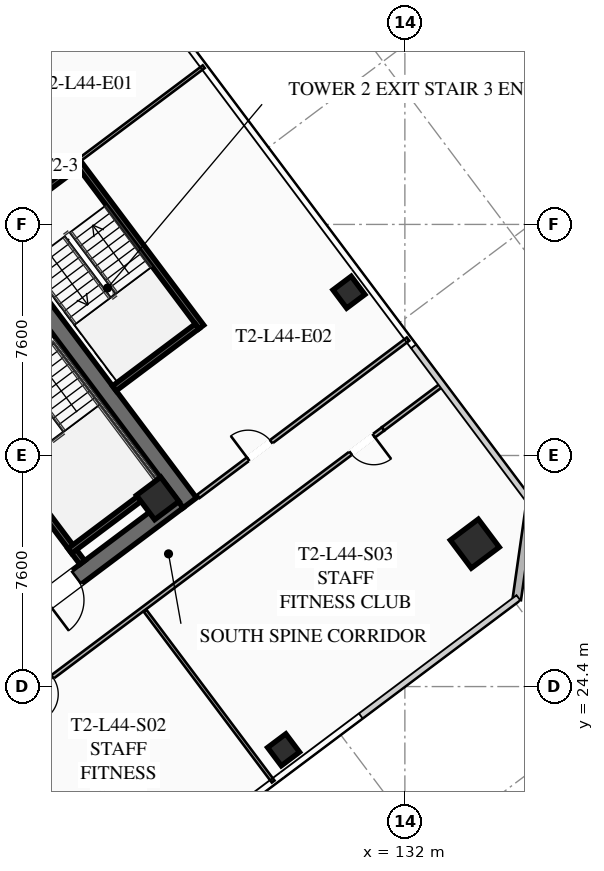
"""IFC4 building model, lengths in metres.
Left out: names, types, materials, properties, quantities, classifications, styles, units other than length and angle.
Written with IfcOpenShell. Run it as: python <this file> out.ifc"""

import sys

from ifc_helpers import new_model, si_unit, direction, frame, frame_2d, origin, origin_2d, place, context, subcontext, project, spatial, rectangle, hollow_rectangle, extrude, element, fill, save


model = new_model("IFC4")
c1 = context("Model", 3, precision=1e-05, world=origin(), true_north=direction((0.0, 1.0)))
c2 = subcontext(c1, "Body", "Model", "MODEL_VIEW")
j1 = project(units=[si_unit("LENGTHUNIT", "METRE"), si_unit("PLANEANGLEUNIT", "RADIAN")], contexts=[c1])
p1 = place(None, origin())
s1 = spatial("IfcSite", under=j1, at=p1, CompositionType="ELEMENT")
p2 = place(p1, origin())
s2 = spatial("IfcBuilding", under=s1, at=p2, CompositionType="ELEMENT")
p3 = place(p2, frame((0.0, 0.0, 164.1)))
s3 = spatial("IfcBuildingStorey", under=s2, at=p3, CompositionType="ELEMENT", Elevation=164.1)
p4 = place(p3, frame((115.564, 42.923, 0.0), z_axis=(0.0, 0.0, 1.0), x_axis=(0.600005007985, -0.799996243986, 0.0)))
e1 = element("IfcWall", 1, at=p4, inside=s3, PredefinedType="SHEAR", context=c2, shape_type="SweptSolid", body=[
    extrude(rectangle(XDim=15.6, YDim=0.55, at=frame_2d((7.8, 0.0))), origin(), (0.0, 0.0, 1.0), 3.55),
])
p5 = place(p3, frame((124.539, 30.498, 0.0), z_axis=(0.0, 0.0, 1.0), x_axis=(-0.799998054672, -0.600002593761, 0.0)))
e2 = element("IfcWall", 2, at=p5, inside=s3, PredefinedType="SHEAR", context=c2, shape_type="SweptSolid", body=[
    extrude(rectangle(XDim=15.06, YDim=0.55, at=frame_2d((7.53, 0.0))), origin(), (0.0, 0.0, 1.0), 3.55),
])
p6 = place(p5, frame((9.23, 0.0, 0.0)))
e3 = element("IfcOpeningElement", 3, at=p6, cuts=e2, PredefinedType="OPENING", context=c2, shape_type="SweptSolid", body=[
    extrude(rectangle(XDim=1.25, YDim=2.25, at=frame_2d((0.625, 1.125))), frame((0.0, 0.285, 0.0), z_axis=(0.0, -1.0, 0.0), x_axis=(1.0, 0.0, 0.0)), (0.0, 0.0, 1.0), 0.57),
])
p7 = place(p5, frame((4.18, 0.0, 0.0)))
e4 = element("IfcOpeningElement", 4, at=p7, cuts=e2, PredefinedType="OPENING", context=c2, shape_type="SweptSolid", body=[
    extrude(rectangle(XDim=1.25, YDim=2.25, at=frame_2d((0.625, 1.125))), frame((0.0, 0.285, 0.0), z_axis=(0.0, -1.0, 0.0), x_axis=(1.0, 0.0, 0.0)), (0.0, 0.0, 1.0), 0.57),
])
p8 = place(p3, frame((123.87, 30.59, 0.0), z_axis=(0.0, 0.0, 1.0), x_axis=(0.799999996291, 0.600000004945, 0.0)))
e5 = element("IfcColumn", 5, at=p8, inside=s3, PredefinedType="COLUMN", context=c2, shape_type="SweptSolid", body=[
    extrude(hollow_rectangle(XDim=1.0, YDim=1.0, WallThickness=0.04, at=origin_2d()), origin(), (0.0, 0.0, 1.0), 3.37),
])
p9 = place(p3, frame((134.3, 29.1, 0.0), z_axis=(0.0, 0.0, 1.0), x_axis=(0.799999996291, 0.600000004945, 0.0)))
e6 = element("IfcColumn", 6, at=p9, inside=s3, PredefinedType="COLUMN", context=c2, shape_type="SweptSolid", body=[
    extrude(hollow_rectangle(XDim=1.15, YDim=1.15, WallThickness=0.045, at=origin_2d()), origin(), (0.0, 0.0, 1.0), 3.37),
])
for number, where, z_axis, x_axis in (
    (7, (128.01, 22.32, 0.0), (0.0, 0.0, 1.0), (0.8, 0.6, 0.0)),
    (8, (130.16, 37.37, 0.0), (0.0, 0.0, 1.0), (0.8, 0.6, 0.0)),
):
    element("IfcColumn", number, at=place(p3, frame(where, z_axis=z_axis, x_axis=x_axis)), inside=s3, PredefinedType="COLUMN", context=c2, shape_type="SweptSolid", body=[
        extrude(hollow_rectangle(XDim=0.75, YDim=0.75, WallThickness=0.032, at=origin_2d()), origin(), (0.0, 0.0, 1.0), 3.37),
    ])
p10 = place(p3, frame((136.14, 30.48, 0.0), z_axis=(0.0, 0.0, 1.0), x_axis=(-0.141410847992, -0.989950994782, 0.0)))
e9 = element("IfcWall", 9, at=p10, inside=s3, PredefinedType="SOLIDWALL", context=c2, shape_type="SweptSolid", body=[
    extrude(rectangle(XDim=3.253, YDim=0.28, at=frame_2d((1.626, 0.0))), origin(), (0.0, 0.0, 1.0), 3.37),
])
p11 = place(p3, frame((116.56, 34.92, 0.0), z_axis=(0.0, 0.0, 1.0), x_axis=(0.59999029481, -0.8000072788, 0.0)))
e10 = element("IfcWall", 10, at=p11, inside=s3, PredefinedType="SHEAR", context=c2, shape_type="SweptSolid", body=[
    extrude(rectangle(XDim=8.05, YDim=0.2, at=frame_2d((4.025, 0.0))), origin(), (0.0, 0.0, 1.0), 3.37),
])
p12 = place(p11, frame((0.45, 0.0, 0.0)))
e11 = element("IfcOpeningElement", 11, at=p12, cuts=e10, PredefinedType="OPENING", context=c2, shape_type="SweptSolid", body=[
    extrude(rectangle(XDim=1.15, YDim=2.2, at=frame_2d((0.575, 1.1))), frame((0.0, 0.11, 0.0), z_axis=(0.0, -1.0, 0.0), x_axis=(1.0, 0.0, 0.0)), (0.0, 0.0, 1.0), 0.22),
])
p13 = place(p3, frame((120.98, 28.86, 0.0), z_axis=(0.0, 0.0, 1.0), x_axis=(0.800015298837, 0.599979601008, 0.0)))
e12 = element("IfcWall", 12, at=p13, inside=s3, PredefinedType="SHEAR", context=c2, shape_type="SweptSolid", body=[
    extrude(rectangle(XDim=3.83, YDim=0.2, at=frame_2d((1.915, 0.0))), origin(), (0.0, 0.0, 1.0), 3.37),
])
p14 = place(p3, frame((125.304, 36.228, 0.0), z_axis=(0.0, 0.0, 1.0), x_axis=(-0.59998851072, 0.800008616831, 0.0)))
e13 = element("IfcWall", 13, at=p14, inside=s3, PredefinedType="SHEAR", context=c2, shape_type="SweptSolid", body=[
    extrude(rectangle(XDim=6.8, YDim=0.2, at=frame_2d((3.4, 0.0))), origin(), (0.0, 0.0, 1.0), 3.37),
])
p15 = place(p3, frame((121.204, 41.528, 0.0), z_axis=(0.0, 0.0, 1.0), x_axis=(-0.800017232136, -0.599977023131, 0.0)))
e14 = element("IfcWall", 14, at=p15, inside=s3, PredefinedType="SHEAR", context=c2, shape_type="SweptSolid", body=[
    extrude(rectangle(XDim=3.4, YDim=0.2, at=frame_2d((1.7, 0.0))), origin(), (0.0, 0.0, 1.0), 3.37),
])
p16 = place(p15, frame((1.975, 0.0, 0.0)))
e15 = element("IfcOpeningElement", 15, at=p16, cuts=e14, PredefinedType="OPENING", context=c2, shape_type="SweptSolid", body=[
    extrude(rectangle(XDim=1.15, YDim=2.2, at=frame_2d((0.575, 1.1))), frame((0.0, 0.11, 0.0), z_axis=(0.0, -1.0, 0.0), x_axis=(1.0, 0.0, 0.0)), (0.0, 0.0, 1.0), 0.22),
])
p17 = place(p3, frame((122.444, 34.208, 0.0), z_axis=(0.0, 0.0, 1.0), x_axis=(0.79999138319, 0.600011488909, 0.0)))
e16 = element("IfcWall", 16, at=p17, inside=s3, PredefinedType="SHEAR", context=c2, shape_type="SweptSolid", body=[
    extrude(rectangle(XDim=3.4, YDim=0.2, at=frame_2d((1.7, 0.0))), origin(), (0.0, 0.0, 1.0), 3.37),
])
p18 = place(p3, frame((131.282, 32.874, 0.0), z_axis=(0.0, 0.0, 1.0), x_axis=(-0.8, -0.6, 0.0)))
e17 = element("IfcWall", 17, at=p18, inside=s3, PredefinedType="PARTITIONING", context=c2, shape_type="SweptSolid", body=[
    extrude(rectangle(XDim=28.7, YDim=0.135, at=frame_2d((14.35, 0.0))), origin(), (0.0, 0.0, 1.0), 2.723),
])
p19 = place(p18, frame((27.37, 0.0, 0.0)))
e18 = element("IfcOpeningElement", 18, at=p19, cuts=e17, PredefinedType="OPENING", context=c2, shape_type="SweptSolid", body=[
    extrude(rectangle(XDim=0.95, YDim=2.05, at=frame_2d((0.475, 1.025))), frame((0.0, 0.077, 0.0), z_axis=(0.0, -1.0, 0.0), x_axis=(1.0, 0.0, 0.0)), (0.0, 0.0, 1.0), 0.155),
])
p20 = place(p18, frame((13.592, 0.0, 0.0)))
e19 = element("IfcOpeningElement", 19, at=p20, cuts=e17, PredefinedType="OPENING", context=c2, shape_type="SweptSolid", body=[
    extrude(rectangle(XDim=0.95, YDim=2.05, at=frame_2d((0.475, 1.025))), frame((0.0, 0.077, 0.0), z_axis=(0.0, -1.0, 0.0), x_axis=(1.0, 0.0, 0.0)), (0.0, 0.0, 1.0), 0.155),
])
p21 = place(p18, frame((0.38, 0.0, 0.0)))
e20 = element("IfcOpeningElement", 20, at=p21, cuts=e17, PredefinedType="OPENING", context=c2, shape_type="SweptSolid", body=[
    extrude(rectangle(XDim=0.95, YDim=2.05, at=frame_2d((0.475, 1.025))), frame((0.0, 0.077, 0.0), z_axis=(0.0, -1.0, 0.0), x_axis=(1.0, 0.0, 0.0)), (0.0, 0.0, 1.0), 0.155),
])
p22 = place(p3, frame((131.282, 32.874, 0.0), z_axis=(0.0, 0.0, 1.0), x_axis=(0.800012055778, 0.599983925293, 0.0)))
e21 = element("IfcWall", 21, at=p22, inside=s3, PredefinedType="PARTITIONING", context=c2, shape_type="SweptSolid", body=[
    extrude(rectangle(XDim=2.43, YDim=0.135, at=frame_2d((1.215, 0.0))), origin(), (0.0, 0.0, 1.0), 2.723),
])
for number, where, z_axis, x_axis in (
    (22, (121.748, 16.836, 0.0), (0.0, 0.0, 1.0), (-0.6, 0.8, 0.0)),
    (23, (127.668, 21.276, 0.0), (0.0, 0.0, 1.0), (-0.6, 0.8, 0.0)),
):
    element("IfcWall", number, at=place(p3, frame(where, z_axis=z_axis, x_axis=x_axis)), inside=s3, PredefinedType="PARTITIONING", context=c2, shape_type="SweptSolid", body=[
        extrude(rectangle(XDim=7.03, YDim=0.11, at=frame_2d((3.515, 0.0))), origin(), (0.0, 0.0, 1.0), 2.723),
    ])
p23 = place(p3, frame((122.744, 48.308, 0.0), z_axis=(0.0, 0.0, 1.0), x_axis=(-0.79997892247, -0.600028102345, 0.0)))
e24 = element("IfcWall", 24, at=p23, inside=s3, PredefinedType="PARTITIONING", context=c2, shape_type="SweptSolid", body=[
    extrude(rectangle(XDim=6.95, YDim=0.135, at=frame_2d((3.475, 0.0))), origin(), (0.0, 0.0, 1.0), 2.723),
])
p24 = place(p23, frame((3.35, 0.0, 0.0)))
e25 = element("IfcOpeningElement", 25, at=p24, cuts=e24, PredefinedType="OPENING", context=c2, shape_type="SweptSolid", body=[
    extrude(rectangle(XDim=0.95, YDim=2.05, at=frame_2d((0.475, 1.025))), frame((0.0, 0.077, 0.0), z_axis=(0.0, -1.0, 0.0), x_axis=(1.0, 0.0, 0.0)), (0.0, 0.0, 1.0), 0.155),
])
p25 = place(p3, frame((125.208, 30.656, 0.0), z_axis=(0.0, 0.0, 1.0), x_axis=(0.800006797429, 0.599990936654, 0.0)))
e26 = element("IfcWall", 26, at=p25, inside=s3, PredefinedType="PARTITIONING", context=c2, shape_type="SweptSolid", body=[
    extrude(rectangle(XDim=8.62, YDim=0.135, at=frame_2d((4.31, 0.0))), origin(), (0.0, 0.0, 1.0), 2.723),
])
p26 = place(p25, frame((2.045, 0.0, 0.0)))
e27 = element("IfcOpeningElement", 27, at=p26, cuts=e26, PredefinedType="OPENING", context=c2, shape_type="SweptSolid", body=[
    extrude(rectangle(XDim=0.95, YDim=2.05, at=frame_2d((0.475, 1.025))), frame((0.0, 0.077, 0.0), z_axis=(0.0, -1.0, 0.0), x_axis=(1.0, 0.0, 0.0)), (0.0, 0.0, 1.0), 0.155),
])
p27 = place(p3, frame((125.384, 44.788, 0.0), z_axis=(0.0, 0.0, 1.0), x_axis=(-0.8, -0.6, 0.0)))
e28 = element("IfcWall", 28, at=p27, inside=s3, PredefinedType="PARTITIONING", context=c2, shape_type="SweptSolid", body=[
    extrude(rectangle(XDim=5.1, YDim=0.11, at=frame_2d((2.55, 0.0))), origin(), (0.0, 0.0, 1.0), 2.723),
])
p28 = place(p7, origin())
e29 = element("IfcDoor", 29, at=p28, inside=s3, OperationType="SINGLE_SWING_RIGHT", PredefinedType="DOOR", context=c2, shape_type="SweptSolid", body=[
    extrude(rectangle(XDim=1.25, YDim=2.25, at=frame_2d((0.625, 1.125))), frame((0.0, 0.025, 0.0), z_axis=(0.0, -1.0, 0.0), x_axis=(1.0, 0.0, 0.0)), (0.0, 0.0, 1.0), 0.05),
])
fill(e4, e29)
p29 = place(p20, origin())
e30 = element("IfcDoor", 30, at=p29, inside=s3, OperationType="SINGLE_SWING_RIGHT", PredefinedType="DOOR", context=c2, shape_type="SweptSolid", body=[
    extrude(rectangle(XDim=0.95, YDim=2.05, at=frame_2d((0.475, 1.025))), frame((0.0, 0.025, 0.0), z_axis=(0.0, -1.0, 0.0), x_axis=(1.0, 0.0, 0.0)), (0.0, 0.0, 1.0), 0.05),
])
fill(e19, e30)
p30 = place(p21, origin())
e31 = element("IfcDoor", 31, at=p30, inside=s3, OperationType="SINGLE_SWING_LEFT", PredefinedType="DOOR", context=c2, shape_type="SweptSolid", body=[
    extrude(rectangle(XDim=0.95, YDim=2.05, at=frame_2d((0.475, 1.025))), frame((0.0, 0.025, 0.0), z_axis=(0.0, -1.0, 0.0), x_axis=(1.0, 0.0, 0.0)), (0.0, 0.0, 1.0), 0.05),
])
fill(e20, e31)
p31 = place(p26, origin())
e32 = element("IfcDoor", 32, at=p31, inside=s3, OperationType="SINGLE_SWING_LEFT", PredefinedType="DOOR", context=c2, shape_type="SweptSolid", body=[
    extrude(rectangle(XDim=0.95, YDim=2.05, at=frame_2d((0.475, 1.025))), frame((0.0, 0.025, 0.0), z_axis=(0.0, -1.0, 0.0), x_axis=(1.0, 0.0, 0.0)), (0.0, 0.0, 1.0), 0.05),
])
fill(e27, e32)
save(model, sys.argv[1])
